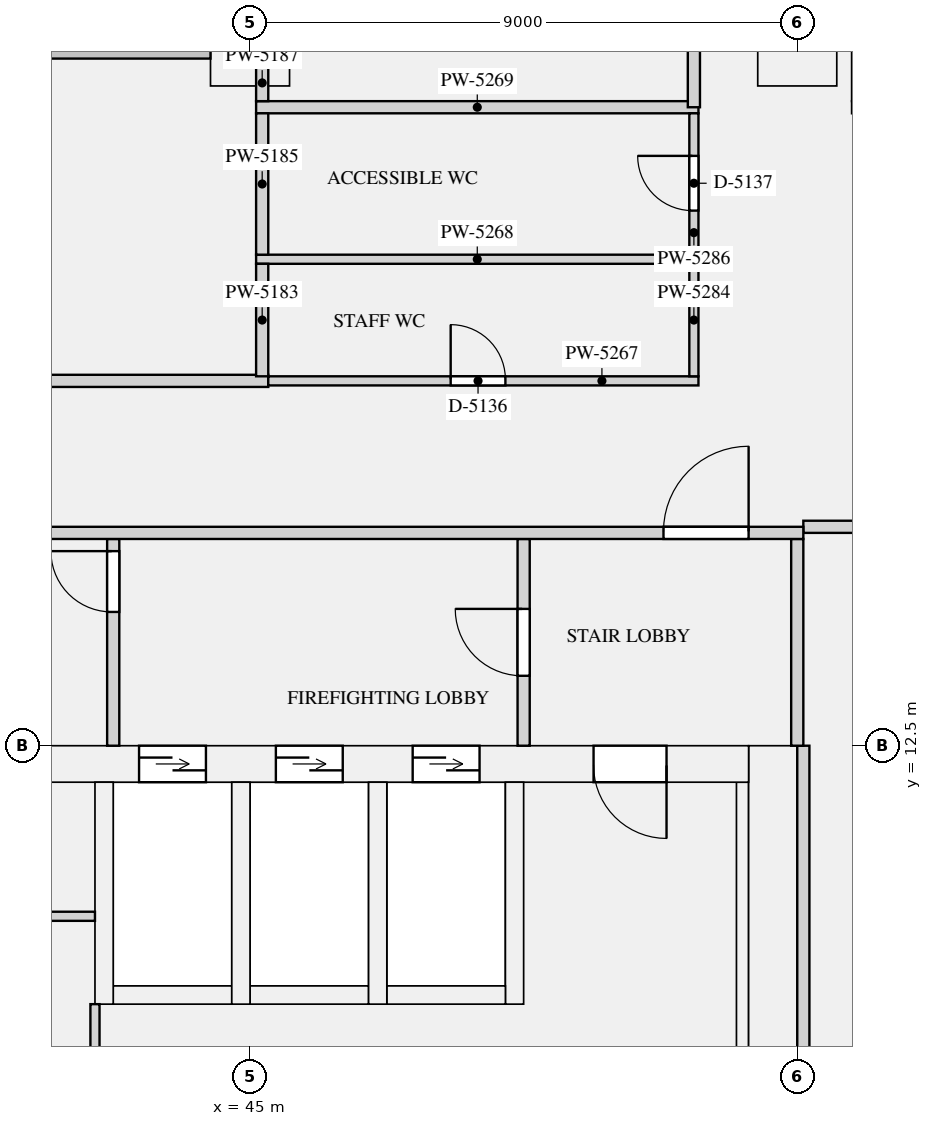
"""IFC4 building model, lengths in metres.
Left out: names, types, materials, properties, quantities, classifications, styles, units other than length and angle.
Written with IfcOpenShell. Run it as: python <this file> out.ifc"""

import sys

from ifc_helpers import new_model, si_unit, direction, frame, frame_2d, origin, origin_2d, place, context, subcontext, project, spatial, rectangle, extrude, element, fill, save


model = new_model("IFC4")
c1 = context("Model", 3, precision=1e-05, world=origin(), true_north=direction((0.0, 1.0)))
c2 = subcontext(c1, "Body", "Model", "MODEL_VIEW")
j1 = project(units=[si_unit("LENGTHUNIT", "METRE"), si_unit("PLANEANGLEUNIT", "RADIAN")], contexts=[c1])
p1 = place(None, origin())
s1 = spatial("IfcSite", under=j1, at=p1, CompositionType="ELEMENT")
p2 = place(p1, origin())
s2 = spatial("IfcBuilding", under=s1, at=p2, CompositionType="ELEMENT")
p3 = place(p2, frame((0.0, 0.0, 137.1)))
s3 = spatial("IfcBuildingStorey", under=s2, at=p3, CompositionType="ELEMENT", Elevation=137.1)
for number, where, z_axis, x_axis in (
    (1, (45.0, 24.0, 0.0), (0.0, 0.0, 1.0), (1.0, 0.0, 0.0)),
    (2, (54.0, 24.0, 0.0), (0.0, 0.0, 1.0), (1.0, 0.0, 0.0)),
):
    element("IfcColumn", number, at=place(p3, frame(where, z_axis=z_axis, x_axis=x_axis)), inside=s3, PredefinedType="COLUMN", context=c2, shape_type="SweptSolid", body=[
        extrude(rectangle(XDim=1.3, YDim=1.3, at=origin_2d()), origin(), (0.0, 0.0, 1.0), 4.2),
    ])
p4 = place(p3, frame((53.6, 0.0, 0.0), z_axis=(0.0, 0.0, 1.0), x_axis=(0.0, 1.0, 0.0)))
e3 = element("IfcWall", 3, at=p4, inside=s3, PredefinedType="SHEAR", context=c2, shape_type="SweptSolid", body=[
    extrude(rectangle(XDim=12.5, YDim=0.8, at=frame_2d((6.25, 0.0))), origin(), (0.0, 0.0, 1.0), 4.2),
])
p5 = place(p3, frame((18.8, 12.2, 0.0), z_axis=(0.0, 0.0, 1.0), x_axis=(1.0, 0.0, 0.0)))
e4 = element("IfcWall", 4, at=p5, inside=s3, PredefinedType="SHEAR", context=c2, shape_type="SweptSolid", body=[
    extrude(rectangle(XDim=34.4, YDim=0.6, at=frame_2d((17.2, 0.0))), origin(), (0.0, 0.0, 1.0), 4.2),
])
p6 = place(p5, frame((24.375, 0.0, 0.0)))
e5 = element("IfcOpeningElement", 5, at=p6, cuts=e4, PredefinedType="OPENING", context=c2, shape_type="SweptSolid", body=[
    extrude(rectangle(XDim=1.1, YDim=2.1, at=frame_2d((0.55, 1.05))), frame((0.0, 0.31, 0.0), z_axis=(0.0, -1.0, 0.0), x_axis=(1.0, 0.0, 0.0)), (0.0, 0.0, 1.0), 0.62),
])
p7 = place(p5, frame((26.625, 0.0, 0.0)))
e6 = element("IfcOpeningElement", 6, at=p7, cuts=e4, PredefinedType="OPENING", context=c2, shape_type="SweptSolid", body=[
    extrude(rectangle(XDim=1.1, YDim=2.1, at=frame_2d((0.55, 1.05))), frame((0.0, 0.31, 0.0), z_axis=(0.0, -1.0, 0.0), x_axis=(1.0, 0.0, 0.0)), (0.0, 0.0, 1.0), 0.62),
])
p8 = place(p5, frame((28.875, 0.0, 0.0)))
e7 = element("IfcOpeningElement", 7, at=p8, cuts=e4, PredefinedType="OPENING", context=c2, shape_type="SweptSolid", body=[
    extrude(rectangle(XDim=1.1, YDim=2.1, at=frame_2d((0.55, 1.05))), frame((0.0, 0.31, 0.0), z_axis=(0.0, -1.0, 0.0), x_axis=(1.0, 0.0, 0.0)), (0.0, 0.0, 1.0), 0.62),
])
p9 = place(p5, frame((18.4, 0.0, 0.0)))
e8 = element("IfcOpeningElement", 8, at=p9, cuts=e4, PredefinedType="OPENING", context=c2, shape_type="SweptSolid", body=[
    extrude(rectangle(XDim=0.9, YDim=2.1, at=frame_2d((0.45, 1.05))), frame((0.0, 0.31, 0.0), z_axis=(0.0, -1.0, 0.0), x_axis=(1.0, 0.0, 0.0)), (0.0, 0.0, 1.0), 0.62),
])
p10 = place(p5, frame((4.45, 0.0, 0.0)))
e9 = element("IfcOpeningElement", 9, at=p10, cuts=e4, PredefinedType="OPENING", context=c2, shape_type="SweptSolid", body=[
    extrude(rectangle(XDim=0.9, YDim=2.1, at=frame_2d((0.45, 1.05))), frame((0.0, 0.31, 0.0), z_axis=(0.0, -1.0, 0.0), x_axis=(1.0, 0.0, 0.0)), (0.0, 0.0, 1.0), 0.62),
])
p11 = place(p5, frame((1.35, 0.0, 0.0)))
e10 = element("IfcOpeningElement", 10, at=p11, cuts=e4, PredefinedType="OPENING", context=c2, shape_type="SweptSolid", body=[
    extrude(rectangle(XDim=1.2, YDim=2.1, at=frame_2d((0.6, 1.05))), frame((0.0, 0.31, 0.0), z_axis=(0.0, -1.0, 0.0), x_axis=(1.0, 0.0, 0.0)), (0.0, 0.0, 1.0), 0.62),
])
p12 = place(p5, frame((31.85, 0.0, 0.0)))
e11 = element("IfcOpeningElement", 11, at=p12, cuts=e4, PredefinedType="OPENING", context=c2, shape_type="SweptSolid", body=[
    extrude(rectangle(XDim=1.2, YDim=2.1, at=frame_2d((0.6, 1.05))), frame((0.0, 0.31, 0.0), z_axis=(0.0, -1.0, 0.0), x_axis=(1.0, 0.0, 0.0)), (0.0, 0.0, 1.0), 0.62),
])
p13 = place(p3, frame((53.1, 1.0, 0.0), z_axis=(0.0, 0.0, 1.0), x_axis=(0.0, 1.0, 0.0)))
e12 = element("IfcWall", 12, at=p13, inside=s3, PredefinedType="SHEAR", context=c2, shape_type="SweptSolid", body=[
    extrude(rectangle(XDim=10.9, YDim=0.2, at=frame_2d((5.45, 0.0))), origin(), (0.0, 0.0, 1.0), 4.2),
])
p14 = place(p3, frame((42.75, 8.4, 0.0), z_axis=(0.0, 0.0, 1.0), x_axis=(1.0, 0.0, 0.0)))
e13 = element("IfcWall", 13, at=p14, inside=s3, PredefinedType="SHEAR", context=c2, shape_type="SweptSolid", body=[
    extrude(rectangle(XDim=1.95, YDim=0.3, at=frame_2d((0.975, 0.0))), origin(), (0.0, 0.0, 1.0), 4.2),
])
p15 = place(p3, frame((42.6, 8.25, 0.0), z_axis=(0.0, 0.0, 1.0), x_axis=(0.0, 1.0, 0.0)))
e14 = element("IfcWall", 14, at=p15, inside=s3, PredefinedType="SHEAR", context=c2, shape_type="SweptSolid", body=[
    extrude(rectangle(XDim=3.65, YDim=0.3, at=frame_2d((1.825, 0.0))), origin(), (0.0, 0.0, 1.0), 4.2),
])
p16 = place(p3, frame((45.0, 8.4, 0.0), z_axis=(0.0, 0.0, 1.0), x_axis=(1.0, 0.0, 0.0)))
e15 = element("IfcWall", 15, at=p16, inside=s3, PredefinedType="SHEAR", context=c2, shape_type="SweptSolid", body=[
    extrude(rectangle(XDim=1.95, YDim=0.3, at=frame_2d((0.975, 0.0))), origin(), (0.0, 0.0, 1.0), 4.2),
])
p17 = place(p3, frame((44.85, 8.25, 0.0), z_axis=(0.0, 0.0, 1.0), x_axis=(0.0, 1.0, 0.0)))
e16 = element("IfcWall", 16, at=p17, inside=s3, PredefinedType="SHEAR", context=c2, shape_type="SweptSolid", body=[
    extrude(rectangle(XDim=3.65, YDim=0.3, at=frame_2d((1.825, 0.0))), origin(), (0.0, 0.0, 1.0), 4.2),
])
p18 = place(p3, frame((47.25, 8.4, 0.0), z_axis=(0.0, 0.0, 1.0), x_axis=(1.0, 0.0, 0.0)))
e17 = element("IfcWall", 17, at=p18, inside=s3, PredefinedType="SHEAR", context=c2, shape_type="SweptSolid", body=[
    extrude(rectangle(XDim=1.95, YDim=0.3, at=frame_2d((0.975, 0.0))), origin(), (0.0, 0.0, 1.0), 4.2),
])
for number, where, z_axis, x_axis in (
    (18, (47.1, 8.25, 0.0), (0.0, 0.0, 1.0), (0.0, 1.0, 0.0)),
    (19, (49.35, 8.25, 0.0), (0.0, 0.0, 1.0), (0.0, 1.0, 0.0)),
):
    element("IfcWall", number, at=place(p3, frame(where, z_axis=z_axis, x_axis=x_axis)), inside=s3, PredefinedType="SHEAR", context=c2, shape_type="SweptSolid", body=[
        extrude(rectangle(XDim=3.65, YDim=0.3, at=frame_2d((1.825, 0.0))), origin(), (0.0, 0.0, 1.0), 4.2),
    ])
p19 = place(p3, frame((36.65, 9.695, 0.0), z_axis=(0.0, 0.0, 1.0), x_axis=(1.0, 0.0, 0.0)))
e20 = element("IfcWall", 20, at=p19, inside=s3, PredefinedType="PARTITIONING", context=c2, shape_type="SweptSolid", body=[
    extrude(rectangle(XDim=5.8, YDim=0.15, at=frame_2d((2.9, 0.0))), origin(), (0.0, 0.0, 1.0), 3.7),
])
p20 = place(p3, frame((42.45, 6.65, 0.0), z_axis=(0.0, 0.0, 1.0), x_axis=(0.0, 1.0, 0.0)))
e21 = element("IfcWall", 21, at=p20, inside=s3, PredefinedType="PARTITIONING", context=c2, shape_type="SweptSolid", body=[
    extrude(rectangle(XDim=1.6, YDim=0.15, at=frame_2d((0.8, 0.0))), origin(), (0.0, 0.0, 1.0), 3.7),
])
p21 = place(p3, frame((42.75, 12.5, 0.0), z_axis=(0.0, 0.0, 1.0), x_axis=(0.0, 1.0, 0.0)))
e22 = element("IfcWall", 22, at=p21, inside=s3, PredefinedType="PARTITIONING", context=c2, shape_type="SweptSolid", body=[
    extrude(rectangle(XDim=3.4, YDim=0.2, at=frame_2d((1.7, 0.0))), origin(), (0.0, 0.0, 1.0), 3.7),
])
p22 = place(p21, frame((2.2, 0.0, 0.0)))
e23 = element("IfcOpeningElement", 23, at=p22, cuts=e22, PredefinedType="OPENING", context=c2, shape_type="SweptSolid", body=[
    extrude(rectangle(XDim=1.0, YDim=2.1, at=frame_2d((0.5, 1.05))), frame((0.0, 0.11, 0.0), z_axis=(0.0, -1.0, 0.0), x_axis=(1.0, 0.0, 0.0)), (0.0, 0.0, 1.0), 0.22),
])
p23 = place(p3, frame((49.5, 12.5, 0.0), z_axis=(0.0, 0.0, 1.0), x_axis=(0.0, 1.0, 0.0)))
e24 = element("IfcWall", 24, at=p23, inside=s3, PredefinedType="PARTITIONING", context=c2, shape_type="SweptSolid", body=[
    extrude(rectangle(XDim=3.4, YDim=0.2, at=frame_2d((1.7, 0.0))), origin(), (0.0, 0.0, 1.0), 3.7),
])
p24 = place(p23, frame((1.15, 0.0, 0.0)))
e25 = element("IfcOpeningElement", 25, at=p24, cuts=e24, PredefinedType="OPENING", context=c2, shape_type="SweptSolid", body=[
    extrude(rectangle(XDim=1.1, YDim=2.1, at=frame_2d((0.55, 1.05))), frame((0.0, 0.11, 0.0), z_axis=(0.0, -1.0, 0.0), x_axis=(1.0, 0.0, 0.0)), (0.0, 0.0, 1.0), 0.22),
])
p25 = place(p3, frame((54.0, 12.5, 0.0), z_axis=(0.0, 0.0, 1.0), x_axis=(0.0, 1.0, 0.0)))
e26 = element("IfcWall", 26, at=p25, inside=s3, PredefinedType="PARTITIONING", context=c2, shape_type="SweptSolid", body=[
    extrude(rectangle(XDim=3.4, YDim=0.2, at=frame_2d((1.7, 0.0))), origin(), (0.0, 0.0, 1.0), 3.7),
])
p26 = place(p3, frame((17.9, 16.0, 0.0), z_axis=(0.0, 0.0, 1.0), x_axis=(1.0, 0.0, 0.0)))
e27 = element("IfcWall", 27, at=p26, inside=s3, PredefinedType="PARTITIONING", context=c2, shape_type="SweptSolid", body=[
    extrude(rectangle(XDim=36.2, YDim=0.2, at=frame_2d((18.1, 0.0))), origin(), (0.0, 0.0, 1.0), 3.7),
])
p27 = place(p26, frame((0.9, 0.0, 0.0)))
e28 = element("IfcOpeningElement", 28, at=p27, cuts=e27, PredefinedType="OPENING", context=c2, shape_type="SweptSolid", body=[
    extrude(rectangle(XDim=1.4, YDim=2.1, at=frame_2d((0.7, 1.05))), frame((0.0, 0.11, 0.0), z_axis=(0.0, -1.0, 0.0), x_axis=(1.0, 0.0, 0.0)), (0.0, 0.0, 1.0), 0.22),
])
p28 = place(p26, frame((33.9, 0.0, 0.0)))
e29 = element("IfcOpeningElement", 29, at=p28, cuts=e27, PredefinedType="OPENING", context=c2, shape_type="SweptSolid", body=[
    extrude(rectangle(XDim=1.4, YDim=2.1, at=frame_2d((0.7, 1.05))), frame((0.0, 0.11, 0.0), z_axis=(0.0, -1.0, 0.0), x_axis=(1.0, 0.0, 0.0)), (0.0, 0.0, 1.0), 0.22),
])
p29 = place(p3, frame((54.1, 16.1, 0.0), z_axis=(0.0, 0.0, 1.0), x_axis=(1.0, 0.0, 0.0)))
e30 = element("IfcWall", 30, at=p29, inside=s3, PredefinedType="PARTITIONING", context=c2, shape_type="SweptSolid", body=[
    extrude(rectangle(XDim=16.075, YDim=0.2, at=frame_2d((8.038, 0.0))), origin(), (0.0, 0.0, 1.0), 3.7),
])
p30 = place(p29, frame((2.3, 0.0, 0.0)))
e31 = element("IfcOpeningElement", 31, at=p30, cuts=e30, PredefinedType="OPENING", context=c2, shape_type="SweptSolid", body=[
    extrude(rectangle(XDim=1.8, YDim=2.1, at=frame_2d((0.9, 1.05))), frame((0.0, 0.11, 0.0), z_axis=(0.0, -1.0, 0.0), x_axis=(1.0, 0.0, 0.0)), (0.0, 0.0, 1.0), 0.22),
])
p31 = place(p29, frame((10.0, 0.0, 0.0)))
e32 = element("IfcOpeningElement", 32, at=p31, cuts=e30, PredefinedType="OPENING", context=c2, shape_type="SweptSolid", body=[
    extrude(rectangle(XDim=1.8, YDim=2.1, at=frame_2d((0.9, 1.05))), frame((0.0, 0.11, 0.0), z_axis=(0.0, -1.0, 0.0), x_axis=(1.0, 0.0, 0.0)), (0.0, 0.0, 1.0), 0.22),
])
p32 = place(p3, frame((26.7, 18.5, 0.0), z_axis=(0.0, 0.0, 1.0), x_axis=(1.0, 0.0, 0.0)))
e33 = element("IfcWall", 33, at=p32, inside=s3, PredefinedType="PARTITIONING", context=c2, shape_type="SweptSolid", body=[
    extrude(rectangle(XDim=18.6, YDim=0.2, at=frame_2d((9.3, 0.0))), origin(), (0.0, 0.0, 1.0), 3.7),
])
p33 = place(p32, frame((3.2, 0.0, 0.0)))
e34 = element("IfcOpeningElement", 34, at=p33, cuts=e33, PredefinedType="OPENING", context=c2, shape_type="SweptSolid", body=[
    extrude(rectangle(XDim=1.0, YDim=2.1, at=frame_2d((0.5, 1.05))), frame((0.0, 0.11, 0.0), z_axis=(0.0, -1.0, 0.0), x_axis=(1.0, 0.0, 0.0)), (0.0, 0.0, 1.0), 0.22),
])
p34 = place(p32, frame((12.3, 0.0, 0.0)))
e35 = element("IfcOpeningElement", 35, at=p34, cuts=e33, PredefinedType="OPENING", context=c2, shape_type="SweptSolid", body=[
    extrude(rectangle(XDim=1.2, YDim=2.1, at=frame_2d((0.6, 1.05))), frame((0.0, 0.11, 0.0), z_axis=(0.0, -1.0, 0.0), x_axis=(1.0, 0.0, 0.0)), (0.0, 0.0, 1.0), 0.22),
])
p35 = place(p3, frame((45.3, 18.5, 0.0), z_axis=(0.0, 0.0, 1.0), x_axis=(1.0, 0.0, 0.0)))
e36 = element("IfcWall", 36, at=p35, inside=s3, PredefinedType="PARTITIONING", context=c2, shape_type="SweptSolid", body=[
    extrude(rectangle(XDim=7.075, YDim=0.15, at=frame_2d((3.538, 0.0))), origin(), (0.0, 0.0, 1.0), 3.7),
])
p36 = place(p35, frame((3.0, 0.0, 0.0)))
e37 = element("IfcOpeningElement", 37, at=p36, cuts=e36, PredefinedType="OPENING", context=c2, shape_type="SweptSolid", body=[
    extrude(rectangle(XDim=0.9, YDim=2.1, at=frame_2d((0.45, 1.05))), frame((0.0, 0.085, 0.0), z_axis=(0.0, -1.0, 0.0), x_axis=(1.0, 0.0, 0.0)), (0.0, 0.0, 1.0), 0.17),
])
p37 = place(p3, frame((45.1, 20.5, 0.0), z_axis=(0.0, 0.0, 1.0), x_axis=(1.0, 0.0, 0.0)))
e38 = element("IfcWall", 38, at=p37, inside=s3, PredefinedType="PARTITIONING", context=c2, shape_type="SweptSolid", body=[
    extrude(rectangle(XDim=7.275, YDim=0.15, at=frame_2d((3.637, 0.0))), origin(), (0.0, 0.0, 1.0), 3.7),
])
p38 = place(p3, frame((45.1, 23.0, 0.0), z_axis=(0.0, 0.0, 1.0), x_axis=(1.0, 0.0, 0.0)))
e39 = element("IfcWall", 39, at=p38, inside=s3, PredefinedType="PARTITIONING", context=c2, shape_type="SweptSolid", body=[
    extrude(rectangle(XDim=7.275, YDim=0.2, at=frame_2d((3.637, 0.0))), origin(), (0.0, 0.0, 1.0), 3.7),
])
p39 = place(p3, frame((54.1, 0.75, 0.0), z_axis=(0.0, 0.0, 1.0), x_axis=(0.0, 1.0, 0.0)))
e40 = element("IfcWall", 40, at=p39, inside=s3, PredefinedType="PARTITIONING", context=c2, shape_type="SweptSolid", body=[
    extrude(rectangle(XDim=11.75, YDim=0.2, at=frame_2d((5.875, 0.0))), origin(), (0.0, 0.0, 1.0), 3.7),
])
p40 = place(p3, frame((45.2, 18.575, 0.0), z_axis=(0.0, 0.0, 1.0), x_axis=(0.0, 1.0, 0.0)))
e41 = element("IfcWall", 41, at=p40, inside=s3, PredefinedType="PARTITIONING", context=c2, shape_type="SweptSolid", body=[
    extrude(rectangle(XDim=1.85, YDim=0.2, at=frame_2d((0.925, 0.0))), origin(), (0.0, 0.0, 1.0), 3.7),
])
p41 = place(p3, frame((52.3, 18.575, 0.0), z_axis=(0.0, 0.0, 1.0), x_axis=(0.0, 1.0, 0.0)))
e42 = element("IfcWall", 42, at=p41, inside=s3, PredefinedType="PARTITIONING", context=c2, shape_type="SweptSolid", body=[
    extrude(rectangle(XDim=1.85, YDim=0.15, at=frame_2d((0.925, 0.0))), origin(), (0.0, 0.0, 1.0), 3.7),
])
p42 = place(p3, frame((45.2, 20.575, 0.0), z_axis=(0.0, 0.0, 1.0), x_axis=(0.0, 1.0, 0.0)))
e43 = element("IfcWall", 43, at=p42, inside=s3, PredefinedType="PARTITIONING", context=c2, shape_type="SweptSolid", body=[
    extrude(rectangle(XDim=2.325, YDim=0.2, at=frame_2d((1.163, 0.0))), origin(), (0.0, 0.0, 1.0), 3.7),
])
p43 = place(p3, frame((52.3, 20.575, 0.0), z_axis=(0.0, 0.0, 1.0), x_axis=(0.0, 1.0, 0.0)))
e44 = element("IfcWall", 44, at=p43, inside=s3, PredefinedType="PARTITIONING", context=c2, shape_type="SweptSolid", body=[
    extrude(rectangle(XDim=2.325, YDim=0.15, at=frame_2d((1.163, 0.0))), origin(), (0.0, 0.0, 1.0), 3.7),
])
p44 = place(p43, frame((0.725, 0.0, 0.0)))
e45 = element("IfcOpeningElement", 45, at=p44, cuts=e44, PredefinedType="OPENING", context=c2, shape_type="SweptSolid", body=[
    extrude(rectangle(XDim=0.9, YDim=2.1, at=frame_2d((0.45, 1.05))), frame((0.0, 0.085, 0.0), z_axis=(0.0, -1.0, 0.0), x_axis=(1.0, 0.0, 0.0)), (0.0, 0.0, 1.0), 0.17),
])
p45 = place(p3, frame((52.3, 23.0, 0.0), z_axis=(0.0, 0.0, 1.0), x_axis=(0.0, 1.0, 0.0)))
e46 = element("IfcWall", 46, at=p45, inside=s3, PredefinedType="PARTITIONING", context=c2, shape_type="SweptSolid", body=[
    extrude(rectangle(XDim=4.0, YDim=0.2, at=frame_2d((2.0, 0.0))), origin(), (0.0, 0.0, 1.0), 3.7),
])
p46 = place(p45, frame((2.5, 0.0, 0.0)))
e47 = element("IfcOpeningElement", 47, at=p46, cuts=e46, PredefinedType="OPENING", context=c2, shape_type="SweptSolid", body=[
    extrude(rectangle(XDim=1.0, YDim=2.1, at=frame_2d((0.5, 1.05))), frame((0.0, 0.11, 0.0), z_axis=(0.0, -1.0, 0.0), x_axis=(1.0, 0.0, 0.0)), (0.0, 0.0, 1.0), 0.22),
])
p47 = place(p3, frame((45.2, 23.1, 0.0), z_axis=(0.0, 0.0, 1.0), x_axis=(0.0, 1.0, 0.0)))
e48 = element("IfcWall", 48, at=p47, inside=s3, PredefinedType="PARTITIONING", context=c2, shape_type="SweptSolid", body=[
    extrude(rectangle(XDim=0.6, YDim=0.2, at=frame_2d((0.3, 0.0))), origin(), (0.0, 0.0, 1.0), 3.7),
])
p48 = place(p6, origin())
e49 = element("IfcDoor", 49, at=p48, inside=s3, OperationType="DOUBLE_DOOR_SLIDING", PredefinedType="DOOR", context=c2, shape_type="SweptSolid", body=[
    extrude(rectangle(XDim=1.1, YDim=2.1, at=frame_2d((0.55, 1.05))), frame((0.0, 0.025, 0.0), z_axis=(0.0, -1.0, 0.0), x_axis=(1.0, 0.0, 0.0)), (0.0, 0.0, 1.0), 0.05),
])
fill(e5, e49)
p49 = place(p7, origin())
e50 = element("IfcDoor", 50, at=p49, inside=s3, OperationType="DOUBLE_DOOR_SLIDING", PredefinedType="DOOR", context=c2, shape_type="SweptSolid", body=[
    extrude(rectangle(XDim=1.1, YDim=2.1, at=frame_2d((0.55, 1.05))), frame((0.0, 0.025, 0.0), z_axis=(0.0, -1.0, 0.0), x_axis=(1.0, 0.0, 0.0)), (0.0, 0.0, 1.0), 0.05),
])
fill(e6, e50)
p50 = place(p8, origin())
e51 = element("IfcDoor", 51, at=p50, inside=s3, OperationType="DOUBLE_DOOR_SLIDING", PredefinedType="DOOR", context=c2, shape_type="SweptSolid", body=[
    extrude(rectangle(XDim=1.1, YDim=2.1, at=frame_2d((0.55, 1.05))), frame((0.0, 0.025, 0.0), z_axis=(0.0, -1.0, 0.0), x_axis=(1.0, 0.0, 0.0)), (0.0, 0.0, 1.0), 0.05),
])
fill(e7, e51)
p51 = place(p12, frame((1.2, 0.0, 0.0), z_axis=(0.0, 0.0, 1.0), x_axis=(-1.0, 0.0, 0.0)))
e52 = element("IfcDoor", 52, at=p51, inside=s3, OperationType="SINGLE_SWING_LEFT", PredefinedType="DOOR", context=c2, shape_type="SweptSolid", body=[
    extrude(rectangle(XDim=1.2, YDim=2.1, at=frame_2d((0.6, 1.05))), frame((0.0, 0.025, 0.0), z_axis=(0.0, -1.0, 0.0), x_axis=(1.0, 0.0, 0.0)), (0.0, 0.0, 1.0), 0.05),
])
fill(e11, e52)
p52 = place(p22, origin())
e53 = element("IfcDoor", 53, at=p52, inside=s3, OperationType="SINGLE_SWING_RIGHT", PredefinedType="DOOR", context=c2, shape_type="SweptSolid", body=[
    extrude(rectangle(XDim=1.0, YDim=2.1, at=frame_2d((0.5, 1.05))), frame((0.0, 0.025, 0.0), z_axis=(0.0, -1.0, 0.0), x_axis=(1.0, 0.0, 0.0)), (0.0, 0.0, 1.0), 0.05),
])
fill(e23, e53)
p53 = place(p24, origin())
e54 = element("IfcDoor", 54, at=p53, inside=s3, OperationType="SINGLE_SWING_RIGHT", PredefinedType="DOOR", context=c2, shape_type="SweptSolid", body=[
    extrude(rectangle(XDim=1.1, YDim=2.1, at=frame_2d((0.55, 1.05))), frame((0.0, 0.025, 0.0), z_axis=(0.0, -1.0, 0.0), x_axis=(1.0, 0.0, 0.0)), (0.0, 0.0, 1.0), 0.05),
])
fill(e25, e54)
p54 = place(p28, origin())
e55 = element("IfcDoor", 55, at=p54, inside=s3, OperationType="SINGLE_SWING_RIGHT", PredefinedType="DOOR", context=c2, shape_type="SweptSolid", body=[
    extrude(rectangle(XDim=1.4, YDim=2.1, at=frame_2d((0.7, 1.05))), frame((0.0, 0.025, 0.0), z_axis=(0.0, -1.0, 0.0), x_axis=(1.0, 0.0, 0.0)), (0.0, 0.0, 1.0), 0.05),
])
fill(e29, e55)
p55 = place(p36, origin())
e56 = element("IfcDoor", 56, at=p55, inside=s3, OperationType="SINGLE_SWING_LEFT", PredefinedType="DOOR", context=c2, shape_type="SweptSolid", body=[
    extrude(rectangle(XDim=0.9, YDim=2.1, at=frame_2d((0.45, 1.05))), frame((0.0, 0.025, 0.0), z_axis=(0.0, -1.0, 0.0), x_axis=(1.0, 0.0, 0.0)), (0.0, 0.0, 1.0), 0.05),
])
fill(e37, e56)
p56 = place(p44, origin())
e57 = element("IfcDoor", 57, at=p56, inside=s3, OperationType="SINGLE_SWING_RIGHT", PredefinedType="DOOR", context=c2, shape_type="SweptSolid", body=[
    extrude(rectangle(XDim=0.9, YDim=2.1, at=frame_2d((0.45, 1.05))), frame((0.0, 0.025, 0.0), z_axis=(0.0, -1.0, 0.0), x_axis=(1.0, 0.0, 0.0)), (0.0, 0.0, 1.0), 0.05),
])
fill(e45, e57)
save(model, sys.argv[1])
